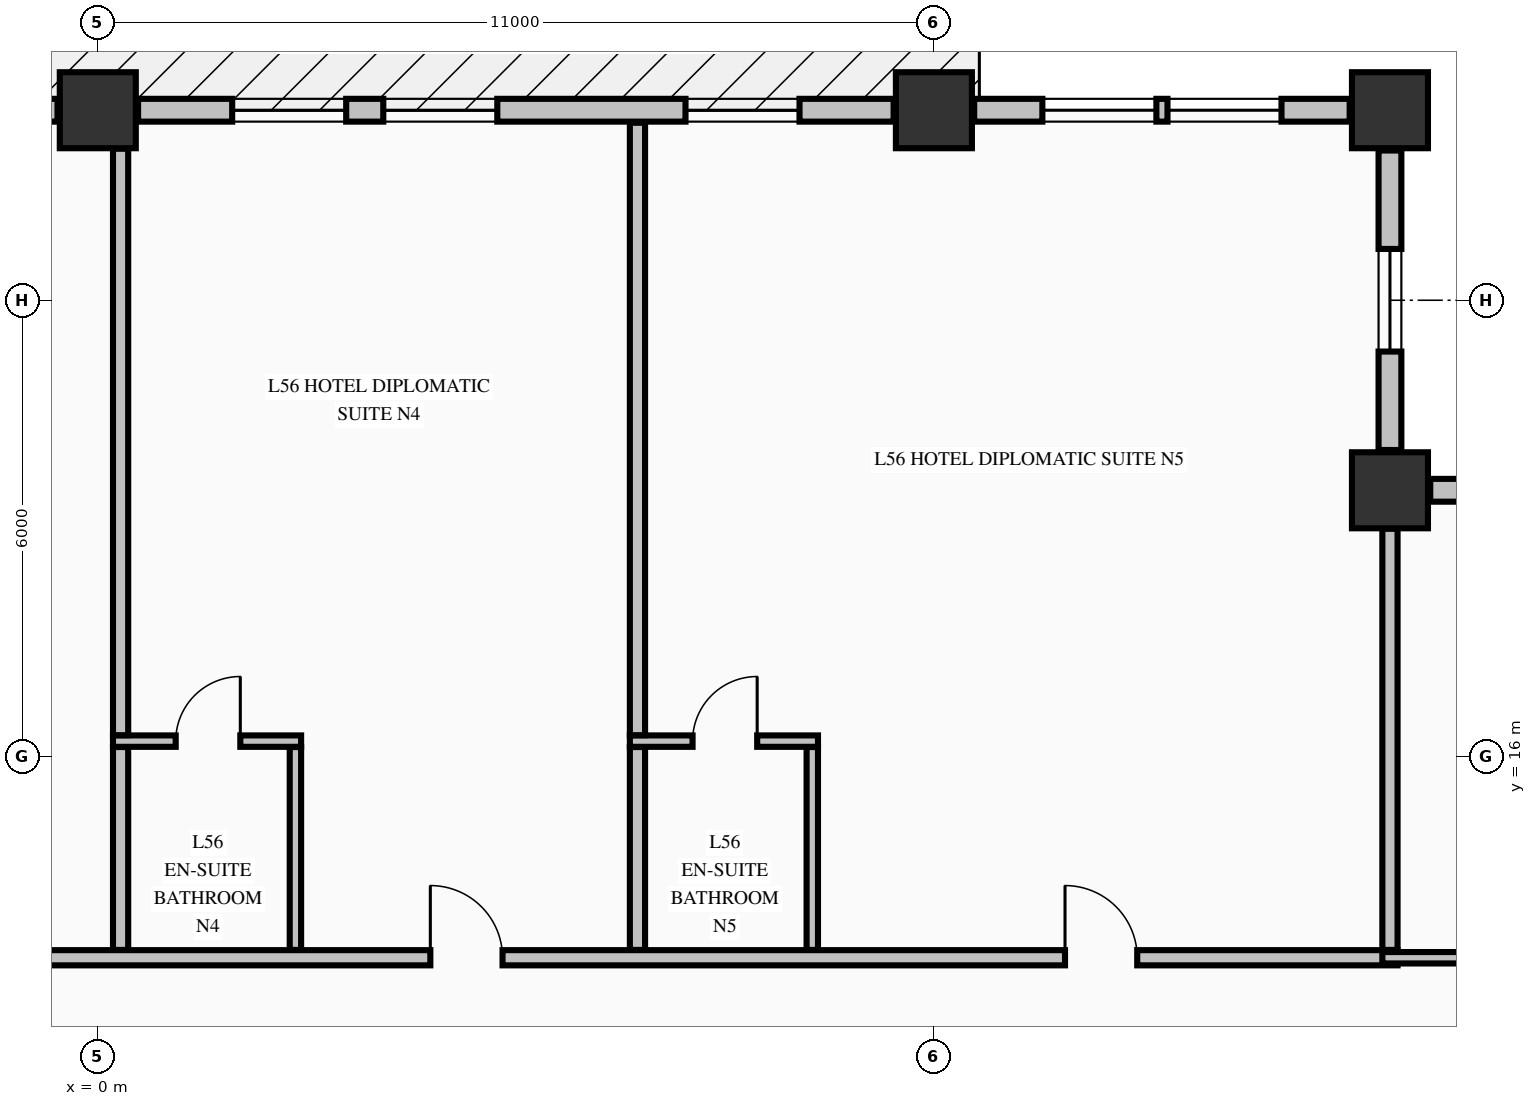
"""IFC4 building model, lengths in metres.
Left out: names, types, materials, properties, quantities, classifications, styles, units other than length and angle.
Written with IfcOpenShell. Run it as: python <this file> out.ifc"""

import sys

from ifc_helpers import new_model, si_unit, direction, frame, frame_2d, origin, origin_2d, place, context, subcontext, project, spatial, rectangle, extrude, element, fill, save


model = new_model("IFC4")
c1 = context("Model", 3, precision=1e-05, world=origin(), true_north=direction((0.0, 1.0)))
c2 = subcontext(c1, "Body", "Model", "MODEL_VIEW")
j1 = project(units=[si_unit("LENGTHUNIT", "METRE"), si_unit("PLANEANGLEUNIT", "RADIAN")], contexts=[c1])
p1 = place(None, origin())
s1 = spatial("IfcSite", under=j1, at=p1, CompositionType="ELEMENT")
p2 = place(p1, origin())
s2 = spatial("IfcBuilding", under=s1, at=p2, CompositionType="ELEMENT")
p3 = place(p2, frame((0.0, 0.0, 215.26)))
s3 = spatial("IfcBuildingStorey", under=s2, at=p3, CompositionType="ELEMENT", Elevation=215.26)
for number, where, z_axis, x_axis in (
    (1, (0.0, 24.5, -0.25), (0.0, 0.0, 1.0), (1.0, 0.0, 0.0)),
    (2, (11.0, 24.5, -0.25), (0.0, 0.0, 1.0), (1.0, 0.0, 0.0)),
    (3, (17.0, 24.5, -0.25), (0.0, 0.0, 1.0), (1.0, 0.0, 0.0)),
    (4, (17.0, 19.5, -0.25), (0.0, 0.0, 1.0), (1.0, 0.0, 0.0)),
):
    element("IfcColumn", number, at=place(p3, frame(where, z_axis=z_axis, x_axis=x_axis)), inside=s3, PredefinedType="COLUMN", context=c2, shape_type="SweptSolid", body=[
        extrude(rectangle(XDim=1.0, YDim=1.0, at=origin_2d()), origin(), (0.0, 0.0, 1.0), 3.4),
    ])
p4 = place(p3, frame((21.47, 19.5, 0.0), z_axis=(0.0, 0.0, 1.0), x_axis=(-1.0, 0.0, 0.0)))
e5 = element("IfcWall", 5, at=p4, inside=s3, PredefinedType="STANDARD", context=c2, shape_type="SweptSolid", body=[
    extrude(rectangle(XDim=3.94, YDim=0.3, at=frame_2d((1.97, 0.0))), origin(), (0.0, 0.0, 1.0), 2.542),
])
p5 = place(p4, frame((1.295, 0.0, 0.68)))
e6 = element("IfcOpeningElement", 6, at=p5, cuts=e5, PredefinedType="OPENING", context=c2, shape_type="SweptSolid", body=[
    extrude(rectangle(XDim=1.35, YDim=1.42, at=frame_2d((0.675, 0.71))), frame((0.0, 0.16, 0.0), z_axis=(0.0, -1.0, 0.0), x_axis=(1.0, 0.0, 0.0)), (0.0, 0.0, 1.0), 0.32),
])
p6 = place(p3, frame((17.0, 20.03, 0.0), z_axis=(0.0, 0.0, 1.0), x_axis=(0.0, 1.0, 0.0)))
e7 = element("IfcWall", 7, at=p6, inside=s3, PredefinedType="STANDARD", context=c2, shape_type="SweptSolid", body=[
    extrude(rectangle(XDim=3.94, YDim=0.3, at=frame_2d((1.97, 0.0))), origin(), (0.0, 0.0, 1.0), 2.542),
])
p7 = place(p6, frame((1.295, 0.0, 0.68)))
e8 = element("IfcOpeningElement", 8, at=p7, cuts=e7, PredefinedType="OPENING", context=c2, shape_type="SweptSolid", body=[
    extrude(rectangle(XDim=1.35, YDim=1.42, at=frame_2d((0.675, 0.71))), frame((0.0, 0.16, 0.0), z_axis=(0.0, -1.0, 0.0), x_axis=(1.0, 0.0, 0.0)), (0.0, 0.0, 1.0), 0.32),
])
p8 = place(p3, frame((-0.53, 24.5, 0.0), z_axis=(0.0, 0.0, 1.0), x_axis=(-1.0, 0.0, 0.0)))
e9 = element("IfcWall", 9, at=p8, inside=s3, PredefinedType="STANDARD", context=c2, shape_type="SweptSolid", body=[
    extrude(rectangle(XDim=9.94, YDim=0.3, at=frame_2d((4.97, 0.0))), origin(), (0.0, 0.0, 1.0), 2.542),
])
p9 = place(p8, frame((3.365, 0.0, 0.0)))
e10 = element("IfcOpeningElement", 10, at=p9, cuts=e9, PredefinedType="OPENING", context=c2, shape_type="SweptSolid", body=[
    extrude(rectangle(XDim=1.1, YDim=2.15, at=frame_2d((0.55, 1.075))), frame((0.0, 0.16, 0.0), z_axis=(0.0, -1.0, 0.0), x_axis=(1.0, 0.0, 0.0)), (0.0, 0.0, 1.0), 0.32),
])
p10 = place(p8, frame((1.238, 0.0, 0.72)))
e11 = element("IfcOpeningElement", 11, at=p10, cuts=e9, PredefinedType="OPENING", context=c2, shape_type="SweptSolid", body=[
    extrude(rectangle(XDim=1.5, YDim=1.6, at=frame_2d((0.75, 0.8))), frame((0.0, 0.16, 0.0), z_axis=(0.0, -1.0, 0.0), x_axis=(1.0, 0.0, 0.0)), (0.0, 0.0, 1.0), 0.32),
])
p11 = place(p8, frame((5.214, 0.0, 0.72)))
e12 = element("IfcOpeningElement", 12, at=p11, cuts=e9, PredefinedType="OPENING", context=c2, shape_type="SweptSolid", body=[
    extrude(rectangle(XDim=1.5, YDim=1.6, at=frame_2d((0.75, 0.8))), frame((0.0, 0.16, 0.0), z_axis=(0.0, -1.0, 0.0), x_axis=(1.0, 0.0, 0.0)), (0.0, 0.0, 1.0), 0.32),
])
p12 = place(p3, frame((10.47, 24.5, 0.0), z_axis=(0.0, 0.0, 1.0), x_axis=(-1.0, 0.0, 0.0)))
e13 = element("IfcWall", 13, at=p12, inside=s3, PredefinedType="STANDARD", context=c2, shape_type="SweptSolid", body=[
    extrude(rectangle(XDim=9.94, YDim=0.3, at=frame_2d((4.97, 0.0))), origin(), (0.0, 0.0, 1.0), 2.542),
])
p13 = place(p12, frame((1.238, 0.0, 0.72)))
e14 = element("IfcOpeningElement", 14, at=p13, cuts=e13, PredefinedType="OPENING", context=c2, shape_type="SweptSolid", body=[
    extrude(rectangle(XDim=1.5, YDim=1.6, at=frame_2d((0.75, 0.8))), frame((0.0, 0.16, 0.0), z_axis=(0.0, -1.0, 0.0), x_axis=(1.0, 0.0, 0.0)), (0.0, 0.0, 1.0), 0.32),
])
p14 = place(p12, frame((5.214, 0.0, 0.72)))
e15 = element("IfcOpeningElement", 15, at=p14, cuts=e13, PredefinedType="OPENING", context=c2, shape_type="SweptSolid", body=[
    extrude(rectangle(XDim=1.5, YDim=1.6, at=frame_2d((0.75, 0.8))), frame((0.0, 0.16, 0.0), z_axis=(0.0, -1.0, 0.0), x_axis=(1.0, 0.0, 0.0)), (0.0, 0.0, 1.0), 0.32),
])
p15 = place(p12, frame((7.202, 0.0, 0.72)))
e16 = element("IfcOpeningElement", 16, at=p15, cuts=e13, PredefinedType="OPENING", context=c2, shape_type="SweptSolid", body=[
    extrude(rectangle(XDim=1.5, YDim=1.6, at=frame_2d((0.75, 0.8))), frame((0.0, 0.16, 0.0), z_axis=(0.0, -1.0, 0.0), x_axis=(1.0, 0.0, 0.0)), (0.0, 0.0, 1.0), 0.32),
])
p16 = place(p3, frame((16.47, 24.5, 0.0), z_axis=(0.0, 0.0, 1.0), x_axis=(-1.0, 0.0, 0.0)))
e17 = element("IfcWall", 17, at=p16, inside=s3, PredefinedType="STANDARD", context=c2, shape_type="SweptSolid", body=[
    extrude(rectangle(XDim=4.94, YDim=0.3, at=frame_2d((2.47, 0.0))), origin(), (0.0, 0.0, 1.0), 2.542),
])
p17 = place(p16, frame((0.897, 0.0, 0.72)))
e18 = element("IfcOpeningElement", 18, at=p17, cuts=e17, PredefinedType="OPENING", context=c2, shape_type="SweptSolid", body=[
    extrude(rectangle(XDim=1.5, YDim=1.6, at=frame_2d((0.75, 0.8))), frame((0.0, 0.16, 0.0), z_axis=(0.0, -1.0, 0.0), x_axis=(1.0, 0.0, 0.0)), (0.0, 0.0, 1.0), 0.32),
])
p18 = place(p16, frame((2.543, 0.0, 0.72)))
e19 = element("IfcOpeningElement", 19, at=p18, cuts=e17, PredefinedType="OPENING", context=c2, shape_type="SweptSolid", body=[
    extrude(rectangle(XDim=1.5, YDim=1.6, at=frame_2d((0.75, 0.8))), frame((0.0, 0.16, 0.0), z_axis=(0.0, -1.0, 0.0), x_axis=(1.0, 0.0, 0.0)), (0.0, 0.0, 1.0), 0.32),
])
p19 = place(p3, frame((-22.1, 13.35, 0.0), z_axis=(0.0, 0.0, 1.0), x_axis=(1.0, 0.0, 0.0)))
e20 = element("IfcWall", 20, at=p19, inside=s3, PredefinedType="PARTITIONING", context=c2, shape_type="SweptSolid", body=[
    extrude(rectangle(XDim=39.2, YDim=0.2, at=frame_2d((19.6, 0.0))), origin(), (0.0, 0.0, 1.0), 3.15),
])
p20 = place(p19, frame((3.825, 0.0, 0.0)))
e21 = element("IfcOpeningElement", 21, at=p20, cuts=e20, PredefinedType="OPENING", context=c2, shape_type="SweptSolid", body=[
    extrude(rectangle(XDim=0.95, YDim=2.15, at=frame_2d((0.475, 1.075))), frame((0.0, 0.11, 0.0), z_axis=(0.0, -1.0, 0.0), x_axis=(1.0, 0.0, 0.0)), (0.0, 0.0, 1.0), 0.22),
])
p21 = place(p19, frame((11.075, 0.0, 0.0)))
e22 = element("IfcOpeningElement", 22, at=p21, cuts=e20, PredefinedType="OPENING", context=c2, shape_type="SweptSolid", body=[
    extrude(rectangle(XDim=0.95, YDim=2.15, at=frame_2d((0.475, 1.075))), frame((0.0, 0.11, 0.0), z_axis=(0.0, -1.0, 0.0), x_axis=(1.0, 0.0, 0.0)), (0.0, 0.0, 1.0), 0.22),
])
p22 = place(p19, frame((18.475, 0.0, 0.0)))
e23 = element("IfcOpeningElement", 23, at=p22, cuts=e20, PredefinedType="OPENING", context=c2, shape_type="SweptSolid", body=[
    extrude(rectangle(XDim=0.95, YDim=2.15, at=frame_2d((0.475, 1.075))), frame((0.0, 0.11, 0.0), z_axis=(0.0, -1.0, 0.0), x_axis=(1.0, 0.0, 0.0)), (0.0, 0.0, 1.0), 0.22),
])
p23 = place(p19, frame((26.475, 0.0, 0.0)))
e24 = element("IfcOpeningElement", 24, at=p23, cuts=e20, PredefinedType="OPENING", context=c2, shape_type="SweptSolid", body=[
    extrude(rectangle(XDim=0.95, YDim=2.15, at=frame_2d((0.475, 1.075))), frame((0.0, 0.11, 0.0), z_axis=(0.0, -1.0, 0.0), x_axis=(1.0, 0.0, 0.0)), (0.0, 0.0, 1.0), 0.22),
])
p24 = place(p19, frame((34.825, 0.0, 0.0)))
e25 = element("IfcOpeningElement", 25, at=p24, cuts=e20, PredefinedType="OPENING", context=c2, shape_type="SweptSolid", body=[
    extrude(rectangle(XDim=0.95, YDim=2.15, at=frame_2d((0.475, 1.075))), frame((0.0, 0.11, 0.0), z_axis=(0.0, -1.0, 0.0), x_axis=(1.0, 0.0, 0.0)), (0.0, 0.0, 1.0), 0.22),
])
p25 = place(p3, frame((16.9, 13.35, 0.0), z_axis=(0.0, 0.0, 1.0), x_axis=(1.0, 0.0, 0.0)))
e26 = element("IfcWall", 26, at=p25, inside=s3, PredefinedType="PARTITIONING", context=c2, shape_type="SweptSolid", body=[
    extrude(rectangle(XDim=3.175, YDim=0.15, at=frame_2d((1.587, 0.0))), origin(), (0.0, 0.0, 1.0), 3.15),
])
p26 = place(p3, frame((0.2, 16.2, 0.0), z_axis=(0.0, 0.0, 1.0), x_axis=(1.0, 0.0, 0.0)))
e27 = element("IfcWall", 27, at=p26, inside=s3, PredefinedType="PARTITIONING", context=c2, shape_type="SweptSolid", body=[
    extrude(rectangle(XDim=2.475, YDim=0.15, at=frame_2d((1.238, 0.0))), origin(), (0.0, 0.0, 1.0), 3.15),
])
p27 = place(p26, frame((0.825, 0.0, 0.0)))
e28 = element("IfcOpeningElement", 28, at=p27, cuts=e27, PredefinedType="OPENING", context=c2, shape_type="SweptSolid", body=[
    extrude(rectangle(XDim=0.85, YDim=2.1, at=frame_2d((0.425, 1.05))), frame((0.0, 0.085, 0.0), z_axis=(0.0, -1.0, 0.0), x_axis=(1.0, 0.0, 0.0)), (0.0, 0.0, 1.0), 0.17),
])
p28 = place(p3, frame((7.0, 16.2, 0.0), z_axis=(0.0, 0.0, 1.0), x_axis=(1.0, 0.0, 0.0)))
e29 = element("IfcWall", 29, at=p28, inside=s3, PredefinedType="PARTITIONING", context=c2, shape_type="SweptSolid", body=[
    extrude(rectangle(XDim=2.475, YDim=0.15, at=frame_2d((1.238, 0.0))), origin(), (0.0, 0.0, 1.0), 3.15),
])
p29 = place(p28, frame((0.825, 0.0, 0.0)))
e30 = element("IfcOpeningElement", 30, at=p29, cuts=e29, PredefinedType="OPENING", context=c2, shape_type="SweptSolid", body=[
    extrude(rectangle(XDim=0.85, YDim=2.1, at=frame_2d((0.425, 1.05))), frame((0.0, 0.085, 0.0), z_axis=(0.0, -1.0, 0.0), x_axis=(1.0, 0.0, 0.0)), (0.0, 0.0, 1.0), 0.17),
])
p30 = place(p3, frame((0.3, 13.453, 0.0), z_axis=(0.0, 0.0, 1.0), x_axis=(0.0, 1.0, 0.0)))
e31 = element("IfcWall", 31, at=p30, inside=s3, PredefinedType="PARTITIONING", context=c2, shape_type="SweptSolid", body=[
    extrude(rectangle(XDim=2.669, YDim=0.2, at=frame_2d((1.334, 0.0))), origin(), (0.0, 0.0, 1.0), 2.342),
])
p31 = place(p3, frame((0.3, 16.278, 0.0), z_axis=(0.0, 0.0, 1.0), x_axis=(0.0, 1.0, 0.0)))
e32 = element("IfcWall", 32, at=p31, inside=s3, PredefinedType="PARTITIONING", context=c2, shape_type="SweptSolid", body=[
    extrude(rectangle(XDim=7.716, YDim=0.2, at=frame_2d((3.858, 0.0))), origin(), (0.0, 0.0, 1.0), 2.342),
])
p32 = place(p3, frame((2.6, 13.453, 0.0), z_axis=(0.0, 0.0, 1.0), x_axis=(0.0, 1.0, 0.0)))
e33 = element("IfcWall", 33, at=p32, inside=s3, PredefinedType="PARTITIONING", context=c2, shape_type="SweptSolid", body=[
    extrude(rectangle(XDim=2.669, YDim=0.15, at=frame_2d((1.334, 0.0))), origin(), (0.0, 0.0, 1.0), 3.15),
])
p33 = place(p3, frame((7.1, 13.453, 0.0), z_axis=(0.0, 0.0, 1.0), x_axis=(0.0, 1.0, 0.0)))
e34 = element("IfcWall", 34, at=p33, inside=s3, PredefinedType="PARTITIONING", context=c2, shape_type="SweptSolid", body=[
    extrude(rectangle(XDim=2.669, YDim=0.2, at=frame_2d((1.334, 0.0))), origin(), (0.0, 0.0, 1.0), 3.15),
])
p34 = place(p3, frame((7.1, 16.278, 0.0), z_axis=(0.0, 0.0, 1.0), x_axis=(0.0, 1.0, 0.0)))
e35 = element("IfcWall", 35, at=p34, inside=s3, PredefinedType="PARTITIONING", context=c2, shape_type="SweptSolid", body=[
    extrude(rectangle(XDim=8.057, YDim=0.2, at=frame_2d((4.028, 0.0))), origin(), (0.0, 0.0, 1.0), 3.15),
])
p35 = place(p3, frame((9.4, 13.453, 0.0), z_axis=(0.0, 0.0, 1.0), x_axis=(0.0, 1.0, 0.0)))
e36 = element("IfcWall", 36, at=p35, inside=s3, PredefinedType="PARTITIONING", context=c2, shape_type="SweptSolid", body=[
    extrude(rectangle(XDim=2.669, YDim=0.15, at=frame_2d((1.334, 0.0))), origin(), (0.0, 0.0, 1.0), 3.15),
])
p36 = place(p3, frame((17.0, 13.453, 0.0), z_axis=(0.0, 0.0, 1.0), x_axis=(0.0, 1.0, 0.0)))
e37 = element("IfcWall", 37, at=p36, inside=s3, PredefinedType="PARTITIONING", context=c2, shape_type="SweptSolid", body=[
    extrude(rectangle(XDim=5.541, YDim=0.2, at=frame_2d((2.771, 0.0))), origin(), (0.0, 0.0, 1.0), 3.15),
])
p37 = place(p7, origin())
e38 = element("IfcWindow", 38, at=p37, inside=s3, PartitioningType="SINGLE_PANEL", PredefinedType="WINDOW", context=c2, shape_type="SweptSolid", body=[
    extrude(rectangle(XDim=1.35, YDim=1.42, at=frame_2d((0.675, 0.71))), frame((0.0, 0.03, 0.0), z_axis=(0.0, -1.0, 0.0), x_axis=(1.0, 0.0, 0.0)), (0.0, 0.0, 1.0), 0.06),
])
fill(e8, e38)
p38 = place(p13, origin())
e39 = element("IfcWindow", 39, at=p38, inside=s3, PartitioningType="SINGLE_PANEL", PredefinedType="WINDOW", context=c2, shape_type="SweptSolid", body=[
    extrude(rectangle(XDim=1.5, YDim=1.6, at=frame_2d((0.75, 0.8))), frame((0.0, 0.03, 0.0), z_axis=(0.0, -1.0, 0.0), x_axis=(1.0, 0.0, 0.0)), (0.0, 0.0, 1.0), 0.06),
])
fill(e14, e39)
p39 = place(p14, origin())
e40 = element("IfcWindow", 40, at=p39, inside=s3, PartitioningType="SINGLE_PANEL", PredefinedType="WINDOW", context=c2, shape_type="SweptSolid", body=[
    extrude(rectangle(XDim=1.5, YDim=1.6, at=frame_2d((0.75, 0.8))), frame((0.0, 0.03, 0.0), z_axis=(0.0, -1.0, 0.0), x_axis=(1.0, 0.0, 0.0)), (0.0, 0.0, 1.0), 0.06),
])
fill(e15, e40)
p40 = place(p15, origin())
e41 = element("IfcWindow", 41, at=p40, inside=s3, PartitioningType="SINGLE_PANEL", PredefinedType="WINDOW", context=c2, shape_type="SweptSolid", body=[
    extrude(rectangle(XDim=1.5, YDim=1.6, at=frame_2d((0.75, 0.8))), frame((0.0, 0.03, 0.0), z_axis=(0.0, -1.0, 0.0), x_axis=(1.0, 0.0, 0.0)), (0.0, 0.0, 1.0), 0.06),
])
fill(e16, e41)
p41 = place(p17, origin())
e42 = element("IfcWindow", 42, at=p41, inside=s3, PartitioningType="SINGLE_PANEL", PredefinedType="WINDOW", context=c2, shape_type="SweptSolid", body=[
    extrude(rectangle(XDim=1.5, YDim=1.6, at=frame_2d((0.75, 0.8))), frame((0.0, 0.03, 0.0), z_axis=(0.0, -1.0, 0.0), x_axis=(1.0, 0.0, 0.0)), (0.0, 0.0, 1.0), 0.06),
])
fill(e18, e42)
p42 = place(p18, origin())
e43 = element("IfcWindow", 43, at=p42, inside=s3, PartitioningType="SINGLE_PANEL", PredefinedType="WINDOW", context=c2, shape_type="SweptSolid", body=[
    extrude(rectangle(XDim=1.5, YDim=1.6, at=frame_2d((0.75, 0.8))), frame((0.0, 0.03, 0.0), z_axis=(0.0, -1.0, 0.0), x_axis=(1.0, 0.0, 0.0)), (0.0, 0.0, 1.0), 0.06),
])
fill(e19, e43)
p43 = place(p23, origin())
e44 = element("IfcDoor", 44, at=p43, inside=s3, OperationType="SINGLE_SWING_LEFT", PredefinedType="DOOR", context=c2, shape_type="SweptSolid", body=[
    extrude(rectangle(XDim=0.95, YDim=2.15, at=frame_2d((0.475, 1.075))), frame((0.0, 0.025, 0.0), z_axis=(0.0, -1.0, 0.0), x_axis=(1.0, 0.0, 0.0)), (0.0, 0.0, 1.0), 0.05),
])
fill(e24, e44)
p44 = place(p27, origin())
e45 = element("IfcDoor", 45, at=p44, inside=s3, OperationType="SINGLE_SWING_RIGHT", PredefinedType="DOOR", context=c2, shape_type="SweptSolid", body=[
    extrude(rectangle(XDim=0.85, YDim=2.1, at=frame_2d((0.425, 1.05))), frame((0.0, 0.025, 0.0), z_axis=(0.0, -1.0, 0.0), x_axis=(1.0, 0.0, 0.0)), (0.0, 0.0, 1.0), 0.05),
])
fill(e28, e45)
p45 = place(p24, origin())
e46 = element("IfcDoor", 46, at=p45, inside=s3, OperationType="SINGLE_SWING_LEFT", PredefinedType="DOOR", context=c2, shape_type="SweptSolid", body=[
    extrude(rectangle(XDim=0.95, YDim=2.15, at=frame_2d((0.475, 1.075))), frame((0.0, 0.025, 0.0), z_axis=(0.0, -1.0, 0.0), x_axis=(1.0, 0.0, 0.0)), (0.0, 0.0, 1.0), 0.05),
])
fill(e25, e46)
p46 = place(p29, origin())
e47 = element("IfcDoor", 47, at=p46, inside=s3, OperationType="SINGLE_SWING_RIGHT", PredefinedType="DOOR", context=c2, shape_type="SweptSolid", body=[
    extrude(rectangle(XDim=0.85, YDim=2.1, at=frame_2d((0.425, 1.05))), frame((0.0, 0.025, 0.0), z_axis=(0.0, -1.0, 0.0), x_axis=(1.0, 0.0, 0.0)), (0.0, 0.0, 1.0), 0.05),
])
fill(e30, e47)
save(model, sys.argv[1])
